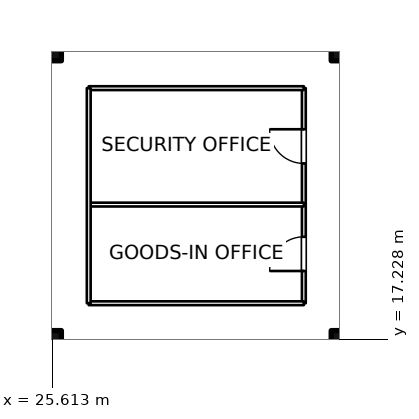
"""IFC4 building model, lengths in metres.
Left out: names, types, materials, properties, quantities, classifications, styles, units other than length and angle.
Written with IfcOpenShell. Run it as: python <this file> out.ifc"""

import sys

from ifc_helpers import new_model, si_unit, direction, frame, frame_2d, origin, origin_2d, place, context, subcontext, project, spatial, rectangle, extrude, element, fill, save


model = new_model("IFC4")
c1 = context("Model", 3, precision=1e-05, world=origin(), true_north=direction((0.0, 1.0)))
c2 = subcontext(c1, "Body", "Model", "MODEL_VIEW")
j1 = project(units=[si_unit("LENGTHUNIT", "METRE"), si_unit("PLANEANGLEUNIT", "RADIAN")], contexts=[c1])
p1 = place(None, origin())
s1 = spatial("IfcSite", under=j1, at=p1, CompositionType="ELEMENT")
p2 = place(p1, origin())
s2 = spatial("IfcBuilding", under=s1, at=p2, CompositionType="ELEMENT")
p3 = place(p2, origin())
s3 = spatial("IfcBuildingStorey", under=s2, at=p3, CompositionType="ELEMENT", Elevation=0.0)
for number, where, z_axis, x_axis in (
    (1, (25.2, 16.8, 0.0), (0.0, 0.0, 1.0), (1.0, 0.0, 0.0)),
    (2, (25.2, 25.2, 0.0), (0.0, 0.0, 1.0), (1.0, 0.0, 0.0)),
    (3, (33.6, 16.8, 0.0), (0.0, 0.0, 1.0), (1.0, 0.0, 0.0)),
    (4, (33.6, 25.2, 0.0), (0.0, 0.0, 1.0), (1.0, 0.0, 0.0)),
):
    element("IfcColumn", number, at=place(p3, frame(where, z_axis=z_axis, x_axis=x_axis)), inside=s3, PredefinedType="COLUMN", context=c2, shape_type="SweptSolid", body=[
        extrude(rectangle(XDim=1.3, YDim=1.3, at=origin_2d()), origin(), (0.0, 0.0, 1.0), 6.0),
    ])
p4 = place(p3, frame((26.57, 18.17, 0.0), z_axis=(0.0, 0.0, 1.0), x_axis=(1.0, 0.0, 0.0)))
e5 = element("IfcWall", 5, at=p4, inside=s3, PredefinedType="PARTITIONING", context=c2, shape_type="SweptSolid", body=[
    extrude(rectangle(XDim=5.66, YDim=0.1, at=frame_2d((2.83, 0.0))), origin(), (0.0, 0.0, 1.0), 5.7),
])
p5 = place(p3, frame((32.23, 18.17, 0.0), z_axis=(0.0, 0.0, 1.0), x_axis=(0.0, 1.0, 0.0)))
e6 = element("IfcWall", 6, at=p5, inside=s3, PredefinedType="PARTITIONING", context=c2, shape_type="SweptSolid", body=[
    extrude(rectangle(XDim=5.66, YDim=0.1, at=frame_2d((2.83, 0.0))), origin(), (0.0, 0.0, 1.0), 5.7),
])
p6 = place(p5, frame((0.848, 0.0, 0.0)))
e7 = element("IfcOpeningElement", 7, at=p6, cuts=e6, PredefinedType="OPENING", context=c2, shape_type="SweptSolid", body=[
    extrude(rectangle(XDim=0.9, YDim=2.1, at=frame_2d((0.45, 1.05))), frame((0.0, 0.06, 0.0), z_axis=(0.0, -1.0, 0.0), x_axis=(1.0, 0.0, 0.0)), (0.0, 0.0, 1.0), 0.12),
])
p7 = place(p5, frame((3.678, 0.0, 0.0)))
e8 = element("IfcOpeningElement", 8, at=p7, cuts=e6, PredefinedType="OPENING", context=c2, shape_type="SweptSolid", body=[
    extrude(rectangle(XDim=0.9, YDim=2.1, at=frame_2d((0.45, 1.05))), frame((0.0, 0.06, 0.0), z_axis=(0.0, -1.0, 0.0), x_axis=(1.0, 0.0, 0.0)), (0.0, 0.0, 1.0), 0.12),
])
p8 = place(p3, frame((32.23, 23.83, 0.0), z_axis=(0.0, 0.0, 1.0), x_axis=(-1.0, 0.0, 0.0)))
e9 = element("IfcWall", 9, at=p8, inside=s3, PredefinedType="PARTITIONING", context=c2, shape_type="SweptSolid", body=[
    extrude(rectangle(XDim=5.66, YDim=0.1, at=frame_2d((2.83, 0.0))), origin(), (0.0, 0.0, 1.0), 5.7),
])
p9 = place(p3, frame((26.57, 23.83, 0.0), z_axis=(0.0, 0.0, 1.0), x_axis=(0.0, -1.0, 0.0)))
e10 = element("IfcWall", 10, at=p9, inside=s3, PredefinedType="PARTITIONING", context=c2, shape_type="SweptSolid", body=[
    extrude(rectangle(XDim=5.66, YDim=0.1, at=frame_2d((2.83, 0.0))), origin(), (0.0, 0.0, 1.0), 5.7),
])
p10 = place(p3, frame((26.57, 20.766, 0.0), z_axis=(0.0, 0.0, 1.0), x_axis=(1.0, 0.0, 0.0)))
e11 = element("IfcWall", 11, at=p10, inside=s3, PredefinedType="PARTITIONING", context=c2, shape_type="SweptSolid", body=[
    extrude(rectangle(XDim=5.66, YDim=0.1, at=frame_2d((2.83, 0.0))), origin(), (0.0, 0.0, 1.0), 5.7),
])
p11 = place(p6, origin())
e12 = element("IfcDoor", 12, at=p11, inside=s3, OperationType="SINGLE_SWING_LEFT", PredefinedType="DOOR", context=c2, shape_type="SweptSolid", body=[
    extrude(rectangle(XDim=0.9, YDim=2.1, at=frame_2d((0.45, 1.05))), frame((0.0, 0.025, 0.0), z_axis=(0.0, -1.0, 0.0), x_axis=(1.0, 0.0, 0.0)), (0.0, 0.0, 1.0), 0.05),
])
fill(e7, e12)
p12 = place(p7, origin())
e13 = element("IfcDoor", 13, at=p12, inside=s3, OperationType="SINGLE_SWING_RIGHT", PredefinedType="DOOR", context=c2, shape_type="SweptSolid", body=[
    extrude(rectangle(XDim=0.9, YDim=2.1, at=frame_2d((0.45, 1.05))), frame((0.0, 0.025, 0.0), z_axis=(0.0, -1.0, 0.0), x_axis=(1.0, 0.0, 0.0)), (0.0, 0.0, 1.0), 0.05),
])
fill(e8, e13)
save(model, sys.argv[1])
